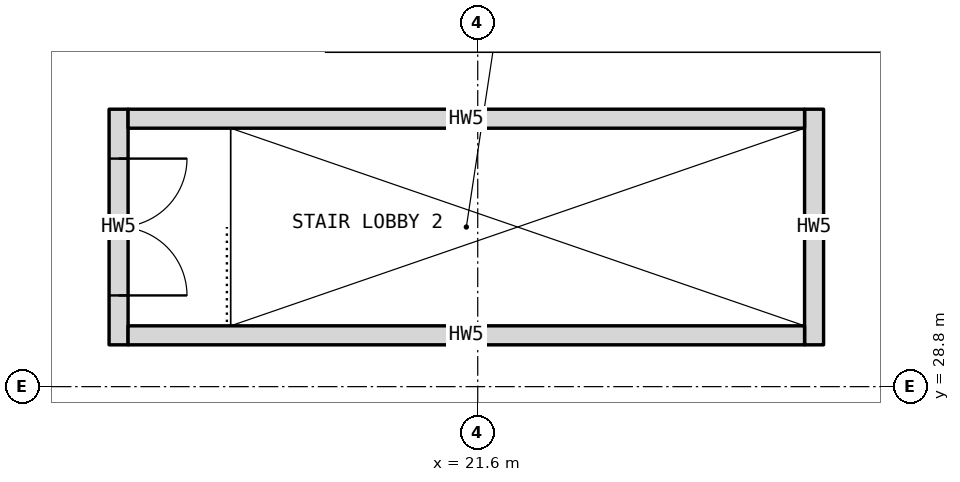
"""IFC4 building model, lengths in metres.
Left out: names, types, materials, properties, quantities, classifications, styles, units other than length and angle.
Written with IfcOpenShell. Run it as: python <this file> out.ifc"""

import sys

from ifc_helpers import new_model, si_unit, direction, frame, frame_2d, origin, place, context, subcontext, project, spatial, rectangle, extrude, element, fill, save


model = new_model("IFC4")
c1 = context("Model", 3, precision=1e-05, world=origin(), true_north=direction((0.0, 1.0)))
c2 = subcontext(c1, "Body", "Model", "MODEL_VIEW")
j1 = project(units=[si_unit("LENGTHUNIT", "METRE"), si_unit("PLANEANGLEUNIT", "RADIAN")], contexts=[c1])
p1 = place(None, origin())
s1 = spatial("IfcSite", under=j1, at=p1, CompositionType="ELEMENT")
p2 = place(p1, origin())
s2 = spatial("IfcBuilding", under=s1, at=p2, CompositionType="ELEMENT")
p3 = place(p2, origin())
s3 = spatial("IfcBuildingStorey", under=s2, at=p3, CompositionType="ELEMENT", Elevation=0.0)
p4 = place(p3, frame((16.875, 29.35, 0.0), z_axis=(0.0, 0.0, 1.0), x_axis=(0.0, 1.0, 0.0)))
e1 = element("IfcWall", 1, at=p4, inside=s3, PredefinedType="SOLIDWALL", context=c2, shape_type="SweptSolid", body=[
    extrude(rectangle(XDim=3.1, YDim=0.25, at=frame_2d((1.55, 0.0))), origin(), (0.0, 0.0, 1.0), 3.2),
])
p5 = place(p4, frame((0.65, 0.0, 0.0)))
e2 = element("IfcOpeningElement", 2, at=p5, cuts=e1, PredefinedType="OPENING", context=c2, shape_type="SweptSolid", body=[
    extrude(rectangle(XDim=1.8, YDim=2.1, at=frame_2d((0.9, 1.05))), frame((0.0, 0.135, 0.0), z_axis=(0.0, -1.0, 0.0), x_axis=(1.0, 0.0, 0.0)), (0.0, 0.0, 1.0), 0.27),
])
p6 = place(p3, frame((26.025, 29.35, 0.0), z_axis=(0.0, 0.0, 1.0), x_axis=(0.0, 1.0, 0.0)))
e3 = element("IfcWall", 3, at=p6, inside=s3, PredefinedType="SOLIDWALL", context=c2, shape_type="SweptSolid", body=[
    extrude(rectangle(XDim=3.1, YDim=0.25, at=frame_2d((1.55, 0.0))), origin(), (0.0, 0.0, 1.0), 3.2),
])
for number, where, z_axis, x_axis in (
    (4, (17.0, 29.475, 0.0), (0.0, 0.0, 1.0), (1.0, 0.0, 0.0)),
    (5, (17.0, 32.325, 0.0), (0.0, 0.0, 1.0), (1.0, 0.0, 0.0)),
):
    element("IfcWall", number, at=place(p3, frame(where, z_axis=z_axis, x_axis=x_axis)), inside=s3, PredefinedType="SOLIDWALL", context=c2, shape_type="SweptSolid", body=[
        extrude(rectangle(XDim=8.9, YDim=0.25, at=frame_2d((4.45, 0.0))), origin(), (0.0, 0.0, 1.0), 3.2),
    ])
p7 = place(p5, frame((1.8, 0.0, 0.0), z_axis=(0.0, 0.0, 1.0), x_axis=(-1.0, 0.0, 0.0)))
e6 = element("IfcDoor", 6, at=p7, inside=s3, OperationType="DOUBLE_DOOR_SINGLE_SWING", PredefinedType="DOOR", context=c2, shape_type="SweptSolid", body=[
    extrude(rectangle(XDim=1.8, YDim=2.1, at=frame_2d((0.9, 1.05))), frame((0.0, 0.025, 0.0), z_axis=(0.0, -1.0, 0.0), x_axis=(1.0, 0.0, 0.0)), (0.0, 0.0, 1.0), 0.05),
])
fill(e2, e6)
save(model, sys.argv[1])
